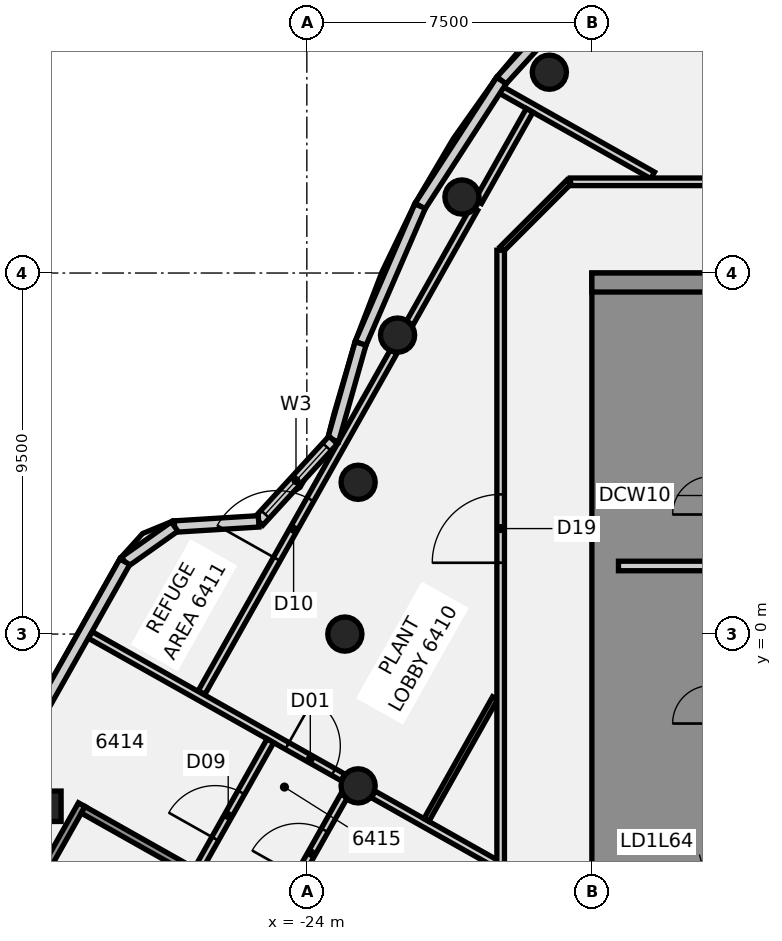
"""IFC4 building model, lengths in metres.
Left out: names, types, materials, properties, quantities, classifications, styles, units other than length and angle.
Written with IfcOpenShell. Run it as: python <this file> out.ifc"""

import sys

from ifc_helpers import new_model, si_unit, direction, frame, frame_2d, origin, origin_2d, place, context, subcontext, project, spatial, polyline, rectangle, circle, outline, extrude, element, fill, save


model = new_model("IFC4")
c1 = context("Model", 3, precision=1e-05, world=origin(), true_north=direction((0.0, 1.0)))
c2 = subcontext(c1, "Body", "Model", "MODEL_VIEW")
j1 = project(units=[si_unit("LENGTHUNIT", "METRE"), si_unit("PLANEANGLEUNIT", "RADIAN")], contexts=[c1])
p1 = place(None, origin())
s1 = spatial("IfcSite", under=j1, at=p1, CompositionType="ELEMENT")
p2 = place(p1, origin())
s2 = spatial("IfcBuilding", under=s1, at=p2, CompositionType="ELEMENT")
p3 = place(p2, frame((0.0, 0.0, 252.3)))
s3 = spatial("IfcBuildingStorey", under=s2, at=p3, CompositionType="ELEMENT", Elevation=252.3)
for number, where, z_axis, x_axis in (
    (1, (-17.619, 14.784, -0.18), (0.0, 0.0, 1.0), (1.0, 0.0, 0.0)),
    (2, (-19.919, 11.5, -0.18), (0.0, 0.0, 1.0), (1.0, 0.0, 0.0)),
    (3, (-21.613, 7.866, -0.18), (0.0, 0.0, 1.0), (1.0, 0.0, 0.0)),
    (4, (-22.651, 3.994, -0.18), (0.0, 0.0, 1.0), (1.0, 0.0, 0.0)),
    (5, (-23.0, 0.0, -0.18), (0.0, 0.0, 1.0), (1.0, 0.0, 0.0)),
    (6, (-22.651, -3.994, -0.18), (0.0, 0.0, 1.0), (1.0, 0.0, 0.0)),
):
    element("IfcColumn", number, at=place(p3, frame(where, z_axis=z_axis, x_axis=x_axis)), inside=s3, PredefinedType="COLUMN", context=c2, shape_type="SweptSolid", body=[
        extrude(circle(Radius=0.45, at=origin_2d()), origin(), (0.0, 0.0, 1.0), 4.54),
    ])
p4 = place(p3, frame((-30.866, -4.531, -0.165), z_axis=(0.0, 0.0, 1.0), x_axis=(0.490928082303, 0.871200102162, 0.0)))
e7 = element("IfcColumn", 7, at=p4, inside=s3, PredefinedType="COLUMN", context=c2, shape_type="SweptSolid", body=[
    extrude(rectangle(XDim=0.8, YDim=0.8, at=origin_2d()), origin(), (0.0, 0.0, 1.0), 4.415),
])
p5 = place(p3, frame((-29.702, -0.022, 0.0), z_axis=(0.0, 0.0, 1.0), x_axis=(0.871230291911, -0.490874503775, 0.0)))
e8 = element("IfcWall", 8, at=p5, inside=s3, PredefinedType="PARTITIONING", context=c2, shape_type="SweptSolid", body=[
    extrude(rectangle(XDim=7.635, YDim=0.2, at=frame_2d((3.817, 0.0))), origin(), (0.0, 0.0, 1.0), 3.66),
])
p6 = place(p5, frame((5.949, 0.0, 0.0)))
e9 = element("IfcOpeningElement", 9, at=p6, cuts=e8, PredefinedType="OPENING", context=c2, shape_type="SweptSolid", body=[
    extrude(rectangle(XDim=1.4, YDim=2.1, at=frame_2d((0.7, 1.05))), frame((0.0, 0.11, 0.0), z_axis=(0.0, -1.0, 0.0), x_axis=(1.0, 0.0, 0.0)), (0.0, 0.0, 1.0), 0.22),
])
p7 = place(p3, frame((-22.251, -4.22, 0.0), z_axis=(0.0, 0.0, 1.0), x_axis=(0.871238479137, -0.490859972366, 0.0)))
e10 = element("IfcWall", 10, at=p7, inside=s3, PredefinedType="PARTITIONING", context=c2, shape_type="SweptSolid", body=[
    extrude(rectangle(XDim=3.697, YDim=0.2, at=frame_2d((1.849, 0.0))), origin(), (0.0, 0.0, 1.0), 3.66),
])
p8 = place(p3, frame((-19.131, 14.453, 0.0), z_axis=(0.0, 0.0, 1.0), x_axis=(0.871219461058, -0.490893726456, 0.0)))
e11 = element("IfcWall", 11, at=p8, inside=s3, PredefinedType="PARTITIONING", context=c2, shape_type="SweptSolid", body=[
    extrude(rectangle(XDim=4.855, YDim=0.2, at=frame_2d((2.428, 0.0))), origin(), (0.0, 0.0, 1.0), 3.66),
])
p9 = place(p3, frame((-17.065, 11.9, 0.0), z_axis=(0.0, 0.0, 1.0), x_axis=(1.0, 0.0, 0.0)))
e12 = element("IfcWall", 12, at=p9, inside=s3, PredefinedType="PARTITIONING", context=c2, shape_type="SweptSolid", body=[
    extrude(rectangle(XDim=34.165, YDim=0.2, at=frame_2d((17.083, 0.0))), origin(), (0.0, 0.0, 1.0), 3.66),
])
p10 = place(p9, frame((22.508, 0.0, 0.0)))
e13 = element("IfcOpeningElement", 13, at=p10, cuts=e12, PredefinedType="OPENING", context=c2, shape_type="SweptSolid", body=[
    extrude(rectangle(XDim=1.8, YDim=2.1, at=frame_2d((0.9, 1.05))), frame((0.0, 0.11, 0.0), z_axis=(0.0, -1.0, 0.0), x_axis=(1.0, 0.0, 0.0)), (0.0, 0.0, 1.0), 0.22),
])
p11 = place(p9, frame((10.115, 0.0, 0.0)))
e14 = element("IfcOpeningElement", 14, at=p11, cuts=e12, PredefinedType="OPENING", context=c2, shape_type="SweptSolid", body=[
    extrude(rectangle(XDim=1.8, YDim=2.1, at=frame_2d((0.9, 1.05))), frame((0.0, 0.11, 0.0), z_axis=(0.0, -1.0, 0.0), x_axis=(1.0, 0.0, 0.0)), (0.0, 0.0, 1.0), 0.22),
])
p12 = place(p3, frame((-18.865, 10.135, 0.0), z_axis=(0.0, 0.0, 1.0), x_axis=(0.707106781187, 0.707106781187, 0.0)))
e15 = element("IfcWall", 15, at=p12, inside=s3, PredefinedType="PARTITIONING", context=c2, shape_type="SweptSolid", body=[
    extrude(rectangle(XDim=2.495, YDim=0.15, at=frame_2d((1.248, 0.0))), origin(), (0.0, 0.0, 1.0), 3.66),
])
p13 = place(p3, frame((-26.855, -6.171, 0.0), z_axis=(0.0, 0.0, 1.0), x_axis=(0.49081668525, 0.871262865891, 0.0)))
e16 = element("IfcWall", 16, at=p13, inside=s3, PredefinedType="PARTITIONING", context=c2, shape_type="SweptSolid", body=[
    extrude(rectangle(XDim=3.86, YDim=0.2, at=frame_2d((1.93, 0.0))), origin(), (0.0, 0.0, 1.0), 3.55),
])
p14 = place(p13, frame((0.9, 0.0, 0.0)))
e17 = element("IfcOpeningElement", 17, at=p14, cuts=e16, PredefinedType="OPENING", context=c2, shape_type="SweptSolid", body=[
    extrude(rectangle(XDim=1.4, YDim=2.1, at=frame_2d((0.7, 1.05))), frame((0.0, 0.11, 0.0), z_axis=(0.0, -1.0, 0.0), x_axis=(1.0, 0.0, 0.0)), (0.0, 0.0, 1.0), 0.22),
])
p15 = place(p3, frame((-26.769, -1.537, 0.0), z_axis=(0.0, 0.0, 1.0), x_axis=(0.490938793305, 0.871194066341, 0.0)))
e18 = element("IfcWall", 18, at=p15, inside=s3, PredefinedType="PARTITIONING", context=c2, shape_type="SweptSolid", body=[
    extrude(rectangle(XDim=10.296, YDim=0.2, at=frame_2d((5.148, 0.0))), origin(), (0.0, 0.0, 1.0), 3.66),
])
p16 = place(p15, frame((4.03, 0.0, 0.0)))
e19 = element("IfcOpeningElement", 19, at=p16, cuts=e18, PredefinedType="OPENING", context=c2, shape_type="SweptSolid", body=[
    extrude(rectangle(XDim=1.8, YDim=2.1, at=frame_2d((0.9, 1.05))), frame((0.0, 0.11, 0.0), z_axis=(0.0, -1.0, 0.0), x_axis=(1.0, 0.0, 0.0)), (0.0, 0.0, 1.0), 0.22),
])
p17 = place(p3, frame((-21.295, 8.177, 0.0), z_axis=(0.0, 0.0, 1.0), x_axis=(0.490973223741, 0.871174663067, 0.0)))
e20 = element("IfcWall", 20, at=p17, inside=s3, PredefinedType="PARTITIONING", context=c2, shape_type="SweptSolid", body=[
    extrude(rectangle(XDim=3.467, YDim=0.2, at=frame_2d((1.733, 0.0))), origin(), (0.0, 0.0, 1.0), 3.66),
])
p18 = place(p3, frame((-19.491, 11.377, 0.0), z_axis=(0.0, 0.0, 1.0), x_axis=(0.490950733336, 0.871187337739, 0.0)))
e21 = element("IfcWall", 21, at=p18, inside=s3, PredefinedType="PARTITIONING", context=c2, shape_type="SweptSolid", body=[
    extrude(rectangle(XDim=2.756, YDim=0.2, at=frame_2d((1.378, 0.0))), origin(), (0.0, 0.0, 1.0), 3.66),
])
p19 = place(p3, frame((-24.97, -7.716, 0.0), z_axis=(0.0, 0.0, 1.0), x_axis=(0.490949481797, 0.871188043033, 0.0)))
e22 = element("IfcWall", 22, at=p19, inside=s3, PredefinedType="PARTITIONING", context=c2, shape_type="SweptSolid", body=[
    extrude(rectangle(XDim=3.974, YDim=0.2, at=frame_2d((1.987, 0.0))), origin(), (0.0, 0.0, 1.0), 3.55),
])
p20 = place(p19, frame((1.53, 0.0, 0.0)))
e23 = element("IfcOpeningElement", 23, at=p20, cuts=e22, PredefinedType="OPENING", context=c2, shape_type="SweptSolid", body=[
    extrude(rectangle(XDim=1.4, YDim=2.1, at=frame_2d((0.7, 1.05))), frame((0.0, 0.11, 0.0), z_axis=(0.0, -1.0, 0.0), x_axis=(1.0, 0.0, 0.0)), (0.0, 0.0, 1.0), 0.22),
])
p21 = place(p3, frame((-20.854, -4.893, 0.0), z_axis=(0.0, 0.0, 1.0), x_axis=(0.490808992491, 0.87126719948, 0.0)))
e24 = element("IfcWall", 24, at=p21, inside=s3, PredefinedType="PARTITIONING", context=c2, shape_type="SweptSolid", body=[
    extrude(rectangle(XDim=3.681, YDim=0.15, at=frame_2d((1.841, 0.0))), origin(), (0.0, 0.0, 1.0), 3.66),
])
p22 = place(p3, frame((-18.9, -10.1, 0.0), z_axis=(0.0, 0.0, 1.0), x_axis=(0.0, 1.0, 0.0)))
e25 = element("IfcWall", 25, at=p22, inside=s3, PredefinedType="PARTITIONING", context=c2, shape_type="SweptSolid", body=[
    extrude(rectangle(XDim=20.2, YDim=0.2, at=frame_2d((10.1, 0.0))), origin(), (0.0, 0.0, 1.0), 3.66),
])
p23 = place(p22, frame((11.976, 0.0, 0.0)))
e26 = element("IfcOpeningElement", 26, at=p23, cuts=e25, PredefinedType="OPENING", context=c2, shape_type="SweptSolid", body=[
    extrude(rectangle(XDim=1.8, YDim=2.1, at=frame_2d((0.9, 1.05))), frame((0.0, 0.11, 0.0), z_axis=(0.0, -1.0, 0.0), x_axis=(1.0, 0.0, 0.0)), (0.0, 0.0, 1.0), 0.22),
])
p24 = place(p3, frame((-16.225, 17.475, 0.0), z_axis=(0.0, 0.0, 1.0), x_axis=(-0.674109155124, -0.738631739758, 0.0)))
e27 = element("IfcWall", 27, at=p24, inside=s3, PredefinedType="SOLIDWALL", context=c2, shape_type="SweptSolid", body=[
    extrude(rectangle(XDim=3.939, YDim=0.3, at=frame_2d((1.969, 0.0))), origin(), (0.0, 0.0, 1.0), 4.36),
])
p25 = place(p3, frame((-18.881, 14.565, 0.0), z_axis=(0.0, 0.0, 1.0), x_axis=(-0.54336180104, -0.839498632024, 0.0)))
e28 = element("IfcWall", 28, at=p25, inside=s3, PredefinedType="SOLIDWALL", context=c2, shape_type="SweptSolid", body=[
    extrude(rectangle(XDim=3.938, YDim=0.3, at=frame_2d((1.969, 0.0))), origin(), (0.0, 0.0, 1.0), 4.36),
])
p26 = place(p3, frame((-21.021, 11.259, 0.0), z_axis=(0.0, 0.0, 1.0), x_axis=(-0.397723990735, -0.917505110173, 0.0)))
e29 = element("IfcWall", 29, at=p26, inside=s3, PredefinedType="SOLIDWALL", context=c2, shape_type="SweptSolid", body=[
    extrude(rectangle(XDim=3.938, YDim=0.3, at=frame_2d((1.969, 0.0))), origin(), (0.0, 0.0, 1.0), 4.36),
])
p27 = place(p3, frame((-22.587, 7.646, 0.0), z_axis=(0.0, 0.0, 1.0), x_axis=(-0.272484089788, -0.962160288524, 0.0)))
e30 = element("IfcWall", 30, at=p27, inside=s3, PredefinedType="SOLIDWALL", context=c2, shape_type="SweptSolid", body=[
    extrude(rectangle(XDim=2.639, YDim=0.3, at=frame_2d((1.319, 0.0))), origin(), (0.0, 0.0, 1.0), 4.36),
])
p28 = place(p3, frame((-23.306, 5.107, 0.0), z_axis=(0.0, 0.0, 1.0), x_axis=(-0.675621829104, -0.737248359807, 0.0)))
e31 = element("IfcWall", 31, at=p28, inside=s3, PredefinedType="SOLIDWALL", context=c2, shape_type="SweptSolid", body=[
    extrude(rectangle(XDim=2.904, YDim=0.3, at=frame_2d((1.452, 0.0))), origin(), (0.0, 0.0, 1.0), 4.36),
])
p29 = place(p28, frame((0.25, 0.0, 1.4)))
e32 = element("IfcOpeningElement", 32, at=p29, cuts=e31, PredefinedType="OPENING", context=c2, shape_type="SweptSolid", body=[
    extrude(rectangle(XDim=2.4, YDim=2.1, at=frame_2d((1.2, 1.05))), frame((0.0, 0.16, 0.0), z_axis=(0.0, -1.0, 0.0), x_axis=(1.0, 0.0, 0.0)), (0.0, 0.0, 1.0), 0.32),
])
p30 = place(p3, frame((-25.268, 2.966, 0.0), z_axis=(0.0, 0.0, 1.0), x_axis=(-0.998097303287, -0.061658520666, 0.0)))
e33 = element("IfcWall", 33, at=p30, inside=s3, PredefinedType="SOLIDWALL", context=c2, shape_type="SweptSolid", body=[
    extrude(rectangle(XDim=2.217, YDim=0.3, at=frame_2d((1.109, 0.0))), origin(), (0.0, 0.0, 1.0), 4.36),
])
p31 = place(p3, frame((-27.481, 2.829, 0.0), z_axis=(0.0, 0.0, 1.0), x_axis=(-0.816419139808, -0.577459771893, 0.0)))
e34 = element("IfcWall", 34, at=p31, inside=s3, PredefinedType="SOLIDWALL", context=c2, shape_type="SweptSolid", body=[
    extrude(rectangle(XDim=1.604, YDim=0.3, at=frame_2d((0.802, 0.0))), origin(), (0.0, 0.0, 1.0), 4.36),
])
p32 = place(p3, frame((-28.791, 1.903, 0.0), z_axis=(0.0, 0.0, 1.0), x_axis=(-0.490929020031, -0.871199573744, 0.0)))
e35 = element("IfcWall", 35, at=p32, inside=s3, PredefinedType="SOLIDWALL", context=c2, shape_type="SweptSolid", body=[
    extrude(rectangle(XDim=14.751, YDim=0.3, at=frame_2d((7.375, 0.0))), origin(), (0.0, 0.0, 1.0), 4.36),
])
p33 = place(p3, origin())
e36 = element("IfcWall", 36, at=p33, inside=s3, PredefinedType="SHEAR", context=c2, shape_type="SweptSolid", body=[
    extrude(outline(polyline([(-13.5, -8.125), (-16.0, -8.125), (-16.0, -5.625), (-13.5, -5.625), (-13.5, -5.375), (-16.0, -5.375), (-16.0, 5.375), (-13.5, 5.375), (-13.5, 5.625), (-16.0, 5.625), (-16.0, 8.125), (-13.5, 8.125), (-13.5, 9.0), (-16.0, 9.0), (-16.5, 9.0), (-16.5, -9.0), (-16.0, -9.0), (-13.5, -9.0), (-13.5, -8.125)])), origin(), (0.0, 0.0, 1.0), 4.36),
])
p34 = place(p3, frame((-16.5, 9.25, 0.0), z_axis=(0.0, 0.0, 1.0), x_axis=(1.0, 0.0, 0.0)))
e37 = element("IfcWall", 37, at=p34, inside=s3, PredefinedType="SHEAR", context=c2, shape_type="SweptSolid", body=[
    extrude(rectangle(XDim=13.0, YDim=0.5, at=frame_2d((6.5, 0.0))), origin(), (0.0, 0.0, 1.0), 4.36),
])
p35 = place(p34, frame((4.15, 0.0, 0.0)))
e38 = element("IfcOpeningElement", 38, at=p35, cuts=e37, PredefinedType="OPENING", context=c2, shape_type="SweptSolid", body=[
    extrude(rectangle(XDim=1.4, YDim=2.1, at=frame_2d((0.7, 1.05))), frame((0.0, 0.26, 0.0), z_axis=(0.0, -1.0, 0.0), x_axis=(1.0, 0.0, 0.0)), (0.0, 0.0, 1.0), 0.52),
])
p36 = place(p3, frame((-15.8, 1.792, 0.0), z_axis=(0.0, 0.0, 1.0), x_axis=(1.0, 0.0, 0.0)))
e39 = element("IfcWall", 39, at=p36, inside=s3, PredefinedType="PARTITIONING", context=c2, shape_type="SweptSolid", body=[
    extrude(rectangle(XDim=2.3, YDim=0.25, at=frame_2d((1.15, 0.0))), origin(), (0.0, 0.0, 1.0), 4.36),
])
p37 = place(p3, frame((-29.924, -4.488, -0.18), z_axis=(0.0, 0.0, 1.0), x_axis=(-0.490946189567, -0.871189898328, 0.0)))
e40 = element("IfcWall", 40, at=p37, inside=s3, PredefinedType="SHEAR", context=c2, shape_type="SweptSolid", body=[
    extrude(rectangle(XDim=6.7, YDim=0.2, at=frame_2d((3.35, 0.0))), origin(), (0.0, 0.0, 1.0), 3.73),
])
p38 = place(p3, frame((-29.886, -4.624, -0.18), z_axis=(0.0, 0.0, 1.0), x_axis=(0.871208567754, -0.490913058975, 0.0)))
e41 = element("IfcWall", 41, at=p38, inside=s3, PredefinedType="SHEAR", context=c2, shape_type="SweptSolid", body=[
    extrude(rectangle(XDim=3.2, YDim=0.2, at=frame_2d((1.6, 0.0))), origin(), (0.0, 0.0, 1.0), 3.73),
])
p39 = place(p6, origin())
e42 = element("IfcDoor", 42, at=p39, inside=s3, OperationType="DOUBLE_DOOR_SINGLE_SWING", PredefinedType="DOOR", context=c2, shape_type="SweptSolid", body=[
    extrude(rectangle(XDim=1.4, YDim=2.1, at=frame_2d((0.7, 1.05))), frame((0.0, 0.025, 0.0), z_axis=(0.0, -1.0, 0.0), x_axis=(1.0, 0.0, 0.0)), (0.0, 0.0, 1.0), 0.05),
])
fill(e9, e42)
p40 = place(p14, origin())
e43 = element("IfcDoor", 43, at=p40, inside=s3, OperationType="DOUBLE_DOOR_SINGLE_SWING", PredefinedType="DOOR", context=c2, shape_type="SweptSolid", body=[
    extrude(rectangle(XDim=1.4, YDim=2.1, at=frame_2d((0.7, 1.05))), frame((0.0, 0.025, 0.0), z_axis=(0.0, -1.0, 0.0), x_axis=(1.0, 0.0, 0.0)), (0.0, 0.0, 1.0), 0.05),
])
fill(e17, e43)
p41 = place(p16, origin())
e44 = element("IfcDoor", 44, at=p41, inside=s3, OperationType="DOUBLE_DOOR_SINGLE_SWING", PredefinedType="DOOR", context=c2, shape_type="SweptSolid", body=[
    extrude(rectangle(XDim=1.8, YDim=2.1, at=frame_2d((0.9, 1.05))), frame((0.0, 0.025, 0.0), z_axis=(0.0, -1.0, 0.0), x_axis=(1.0, 0.0, 0.0)), (0.0, 0.0, 1.0), 0.05),
])
fill(e19, e44)
p42 = place(p20, frame((1.4, 0.0, 0.0), z_axis=(0.0, 0.0, 1.0), x_axis=(-1.0, 0.0, 0.0)))
e45 = element("IfcDoor", 45, at=p42, inside=s3, OperationType="DOUBLE_DOOR_SINGLE_SWING", PredefinedType="DOOR", context=c2, shape_type="SweptSolid", body=[
    extrude(rectangle(XDim=1.4, YDim=2.1, at=frame_2d((0.7, 1.05))), frame((0.0, 0.025, 0.0), z_axis=(0.0, -1.0, 0.0), x_axis=(1.0, 0.0, 0.0)), (0.0, 0.0, 1.0), 0.05),
])
fill(e23, e45)
p43 = place(p23, frame((1.8, 0.0, 0.0), z_axis=(0.0, 0.0, 1.0), x_axis=(-1.0, 0.0, 0.0)))
e46 = element("IfcDoor", 46, at=p43, inside=s3, OperationType="DOUBLE_DOOR_SINGLE_SWING", PredefinedType="DOOR", context=c2, shape_type="SweptSolid", body=[
    extrude(rectangle(XDim=1.8, YDim=2.1, at=frame_2d((0.9, 1.05))), frame((0.0, 0.025, 0.0), z_axis=(0.0, -1.0, 0.0), x_axis=(1.0, 0.0, 0.0)), (0.0, 0.0, 1.0), 0.05),
])
fill(e26, e46)
p44 = place(p29, origin())
e47 = element("IfcWindow", 47, at=p44, inside=s3, PartitioningType="SINGLE_PANEL", PredefinedType="WINDOW", context=c2, shape_type="SweptSolid", body=[
    extrude(rectangle(XDim=2.4, YDim=2.1, at=frame_2d((1.2, 1.05))), frame((0.0, 0.03, 0.0), z_axis=(0.0, -1.0, 0.0), x_axis=(1.0, 0.0, 0.0)), (0.0, 0.0, 1.0), 0.06),
])
fill(e32, e47)
save(model, sys.argv[1])
